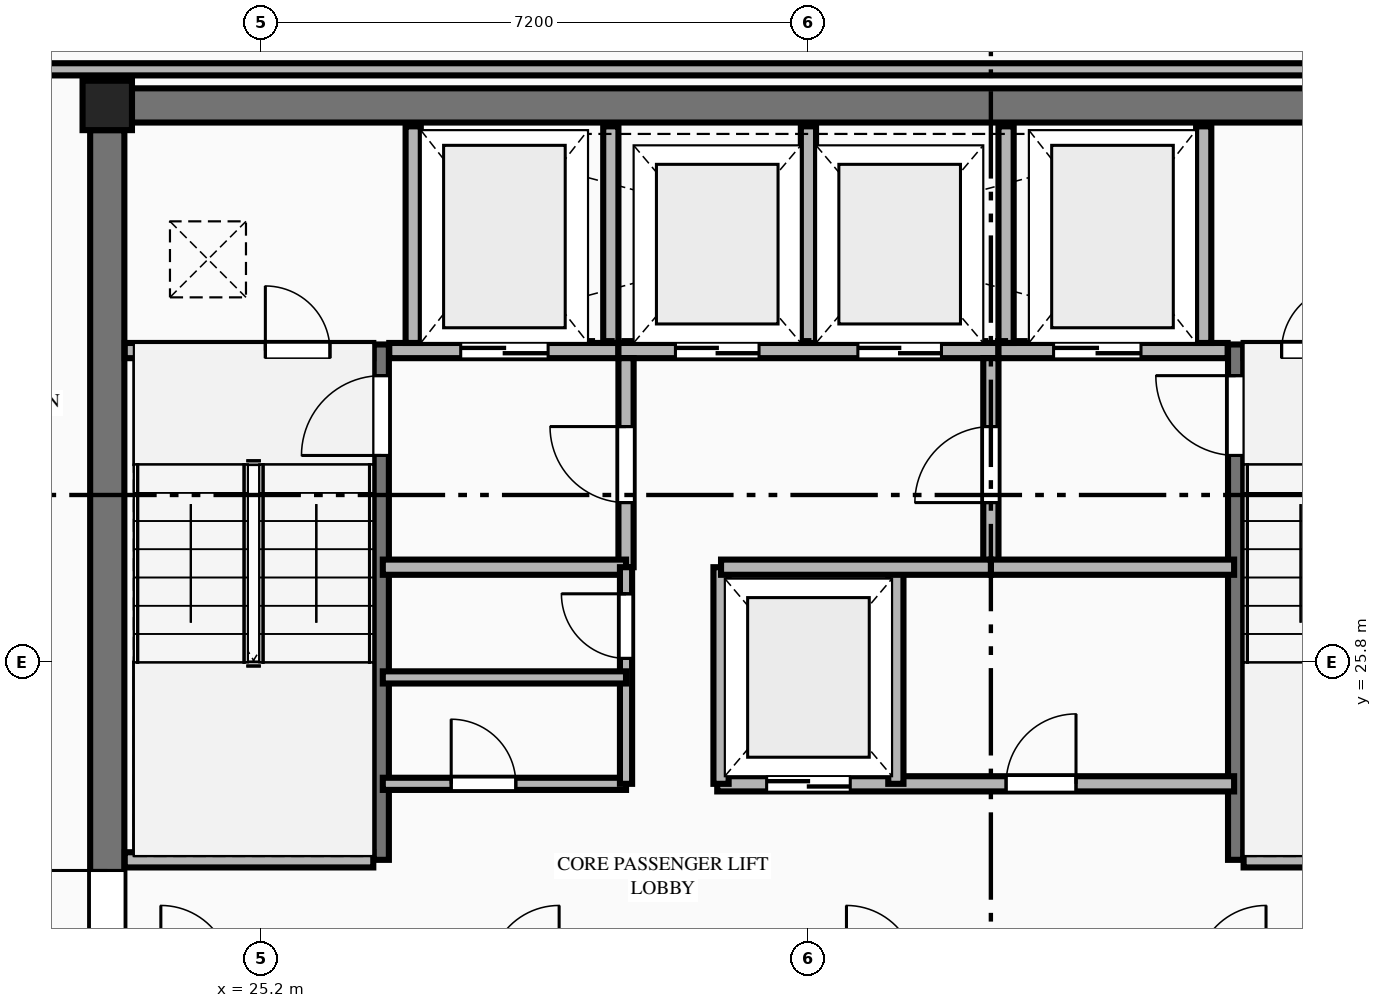
"""IFC4 building model, lengths in metres.
Left out: names, types, materials, properties, quantities, classifications, styles, units other than length and angle.
Written with IfcOpenShell. Run it as: python <this file> out.ifc"""

import sys

from ifc_helpers import new_model, si_unit, direction, frame, frame_2d, origin, origin_2d, place, context, subcontext, project, spatial, rectangle, extrude, element, fill, save


model = new_model("IFC4")
c1 = context("Model", 3, precision=1e-05, world=origin(), true_north=direction((0.0, 1.0)))
c2 = subcontext(c1, "Body", "Model", "MODEL_VIEW")
j1 = project(units=[si_unit("LENGTHUNIT", "METRE"), si_unit("PLANEANGLEUNIT", "RADIAN")], contexts=[c1])
p1 = place(None, origin())
s1 = spatial("IfcSite", under=j1, at=p1, CompositionType="ELEMENT")
p2 = place(p1, origin())
s2 = spatial("IfcBuilding", under=s1, at=p2, CompositionType="ELEMENT")
p3 = place(p2, frame((0.0, 0.0, 278.1)))
s3 = spatial("IfcBuildingStorey", under=s2, at=p3, CompositionType="ELEMENT", Elevation=278.1)
p4 = place(p3, frame((23.175, 33.125, 0.0), z_axis=(0.0, 0.0, 1.0), x_axis=(1.0, 0.0, 0.0)))
e1 = element("IfcColumn", 1, at=p4, inside=s3, PredefinedType="COLUMN", context=c2, shape_type="SweptSolid", body=[
    extrude(rectangle(XDim=0.65, YDim=0.65, at=origin_2d()), origin(), (0.0, 0.0, 1.0), 5.4),
])
p5 = place(p3, frame((23.5, 33.125, 0.0), z_axis=(0.0, 0.0, 1.0), x_axis=(1.0, 0.0, 0.0)))
e2 = element("IfcWall", 2, at=p5, inside=s3, PredefinedType="SHEAR", context=c2, shape_type="SweptSolid", body=[
    extrude(rectangle(XDim=17.8, YDim=0.45, at=frame_2d((8.9, 0.0))), origin(), (0.0, 0.0, 1.0), 5.2),
])
p6 = place(p3, frame((23.175, 19.0, 0.0), z_axis=(0.0, 0.0, 1.0), x_axis=(0.0, 1.0, 0.0)))
e3 = element("IfcWall", 3, at=p6, inside=s3, PredefinedType="SHEAR", context=c2, shape_type="SweptSolid", body=[
    extrude(rectangle(XDim=13.8, YDim=0.45, at=frame_2d((6.9, 0.0))), origin(), (0.0, 0.0, 1.0), 5.2),
])
p7 = place(p6, frame((2.84, 0.0, 0.0)))
e4 = element("IfcOpeningElement", 4, at=p7, cuts=e3, PredefinedType="OPENING", context=c2, shape_type="SweptSolid", body=[
    extrude(rectangle(XDim=1.22, YDim=2.25, at=frame_2d((0.61, 1.125))), frame((0.0, 0.235, 0.0), z_axis=(0.0, -1.0, 0.0), x_axis=(1.0, 0.0, 0.0)), (0.0, 0.0, 1.0), 0.47),
])
p8 = place(p3, frame((26.78, 23.2, 0.0), z_axis=(0.0, 0.0, 1.0), x_axis=(0.0, 1.0, 0.0)))
e5 = element("IfcWall", 5, at=p8, inside=s3, PredefinedType="SHEAR", context=c2, shape_type="SweptSolid", body=[
    extrude(rectangle(XDim=6.78, YDim=0.2, at=frame_2d((3.39, 0.0))), origin(), (0.0, 0.0, 1.0), 5.4),
])
p9 = place(p8, frame((5.32, 0.0, 0.0)))
e6 = element("IfcOpeningElement", 6, at=p9, cuts=e5, PredefinedType="OPENING", context=c2, shape_type="SweptSolid", body=[
    extrude(rectangle(XDim=1.05, YDim=2.15, at=frame_2d((0.525, 1.075))), frame((0.0, 0.11, 0.0), z_axis=(0.0, -1.0, 0.0), x_axis=(1.0, 0.0, 0.0)), (0.0, 0.0, 1.0), 0.22),
])
p10 = place(p3, frame((23.405, 23.2, 0.0), z_axis=(0.0, 0.0, 1.0), x_axis=(1.0, 0.0, 0.0)))
e7 = element("IfcWall", 7, at=p10, inside=s3, PredefinedType="PLUMBINGWALL", context=c2, shape_type="SweptSolid", body=[
    extrude(rectangle(XDim=3.27, YDim=0.2, at=frame_2d((1.635, 0.0))), origin(), (0.0, 0.0, 1.0), 5.2),
])
p11 = place(p3, frame((38.02, 23.2, 0.0), z_axis=(0.0, 0.0, 1.0), x_axis=(0.0, 1.0, 0.0)))
e8 = element("IfcWall", 8, at=p11, inside=s3, PredefinedType="SHEAR", context=c2, shape_type="SweptSolid", body=[
    extrude(rectangle(XDim=6.78, YDim=0.2, at=frame_2d((3.39, 0.0))), origin(), (0.0, 0.0, 1.0), 5.4),
])
p12 = place(p11, frame((5.32, 0.0, 0.0)))
e9 = element("IfcOpeningElement", 9, at=p12, cuts=e8, PredefinedType="OPENING", context=c2, shape_type="SweptSolid", body=[
    extrude(rectangle(XDim=1.05, YDim=2.15, at=frame_2d((0.525, 1.075))), frame((0.0, 0.11, 0.0), z_axis=(0.0, -1.0, 0.0), x_axis=(1.0, 0.0, 0.0)), (0.0, 0.0, 1.0), 0.22),
])
p13 = place(p3, frame((38.125, 23.2, 0.0), z_axis=(0.0, 0.0, 1.0), x_axis=(1.0, 0.0, 0.0)))
e10 = element("IfcWall", 10, at=p13, inside=s3, PredefinedType="PLUMBINGWALL", context=c2, shape_type="SweptSolid", body=[
    extrude(rectangle(XDim=3.27, YDim=0.2, at=frame_2d((1.635, 0.0))), origin(), (0.0, 0.0, 1.0), 5.2),
])
p14 = place(p3, frame((23.405, 29.9, 0.0), z_axis=(0.0, 0.0, 1.0), x_axis=(1.0, 0.0, 0.0)))
e11 = element("IfcWall", 11, at=p14, inside=s3, PredefinedType="PLUMBINGWALL", context=c2, shape_type="SweptSolid", body=[
    extrude(rectangle(XDim=3.27, YDim=0.2, at=frame_2d((1.635, 0.0))), origin(), (0.0, 0.0, 1.0), 5.2),
])
p15 = place(p14, frame((1.85, 0.0, 0.0)))
e12 = element("IfcOpeningElement", 12, at=p15, cuts=e11, PredefinedType="OPENING", context=c2, shape_type="SweptSolid", body=[
    extrude(rectangle(XDim=0.85, YDim=2.05, at=frame_2d((0.425, 1.025))), frame((0.0, 0.11, 0.0), z_axis=(0.0, -1.0, 0.0), x_axis=(1.0, 0.0, 0.0)), (0.0, 0.0, 1.0), 0.22),
])
p16 = place(p3, frame((26.885, 29.9, 0.0), z_axis=(0.0, 0.0, 1.0), x_axis=(1.0, 0.0, 0.0)))
e13 = element("IfcWall", 13, at=p16, inside=s3, PredefinedType="PLUMBINGWALL", context=c2, shape_type="SweptSolid", body=[
    extrude(rectangle(XDim=3.015, YDim=0.2, at=frame_2d((1.507, 0.0))), origin(), (0.0, 0.0, 1.0), 5.2),
])
p17 = place(p16, frame((0.94, 0.0, 0.0)))
e14 = element("IfcOpeningElement", 14, at=p17, cuts=e13, PredefinedType="OPENING", context=c2, shape_type="SweptSolid", body=[
    extrude(rectangle(XDim=1.15, YDim=2.2, at=frame_2d((0.575, 1.1))), frame((0.0, 0.11, 0.0), z_axis=(0.0, -1.0, 0.0), x_axis=(1.0, 0.0, 0.0)), (0.0, 0.0, 1.0), 0.22),
])
p18 = place(p3, frame((29.9, 29.9, 0.0), z_axis=(0.0, 0.0, 1.0), x_axis=(1.0, 0.0, 0.0)))
e15 = element("IfcWall", 15, at=p18, inside=s3, PredefinedType="PLUMBINGWALL", context=c2, shape_type="SweptSolid", body=[
    extrude(rectangle(XDim=5.0, YDim=0.2, at=frame_2d((2.5, 0.0))), origin(), (0.0, 0.0, 1.0), 5.2),
])
p19 = place(p18, frame((0.75, 0.0, 0.0)))
e16 = element("IfcOpeningElement", 16, at=p19, cuts=e15, PredefinedType="OPENING", context=c2, shape_type="SweptSolid", body=[
    extrude(rectangle(XDim=1.1, YDim=2.2, at=frame_2d((0.55, 1.1))), frame((0.0, 0.11, 0.0), z_axis=(0.0, -1.0, 0.0), x_axis=(1.0, 0.0, 0.0)), (0.0, 0.0, 1.0), 0.22),
])
p20 = place(p18, frame((3.15, 0.0, 0.0)))
e17 = element("IfcOpeningElement", 17, at=p20, cuts=e15, PredefinedType="OPENING", context=c2, shape_type="SweptSolid", body=[
    extrude(rectangle(XDim=1.1, YDim=2.2, at=frame_2d((0.55, 1.1))), frame((0.0, 0.11, 0.0), z_axis=(0.0, -1.0, 0.0), x_axis=(1.0, 0.0, 0.0)), (0.0, 0.0, 1.0), 0.22),
])
p21 = place(p3, frame((34.9, 29.9, 0.0), z_axis=(0.0, 0.0, 1.0), x_axis=(1.0, 0.0, 0.0)))
e18 = element("IfcWall", 18, at=p21, inside=s3, PredefinedType="PLUMBINGWALL", context=c2, shape_type="SweptSolid", body=[
    extrude(rectangle(XDim=3.015, YDim=0.2, at=frame_2d((1.508, 0.0))), origin(), (0.0, 0.0, 1.0), 5.2),
])
p22 = place(p21, frame((0.725, 0.0, 0.0)))
e19 = element("IfcOpeningElement", 19, at=p22, cuts=e18, PredefinedType="OPENING", context=c2, shape_type="SweptSolid", body=[
    extrude(rectangle(XDim=1.15, YDim=2.2, at=frame_2d((0.575, 1.1))), frame((0.0, 0.11, 0.0), z_axis=(0.0, -1.0, 0.0), x_axis=(1.0, 0.0, 0.0)), (0.0, 0.0, 1.0), 0.22),
])
p23 = place(p3, frame((38.125, 29.9, 0.0), z_axis=(0.0, 0.0, 1.0), x_axis=(1.0, 0.0, 0.0)))
e20 = element("IfcWall", 20, at=p23, inside=s3, PredefinedType="PLUMBINGWALL", context=c2, shape_type="SweptSolid", body=[
    extrude(rectangle(XDim=3.27, YDim=0.2, at=frame_2d((1.635, 0.0))), origin(), (0.0, 0.0, 1.0), 5.2),
])
p24 = place(p23, frame((0.5, 0.0, 0.0)))
e21 = element("IfcOpeningElement", 21, at=p24, cuts=e20, PredefinedType="OPENING", context=c2, shape_type="SweptSolid", body=[
    extrude(rectangle(XDim=0.85, YDim=2.05, at=frame_2d((0.425, 1.025))), frame((0.0, 0.11, 0.0), z_axis=(0.0, -1.0, 0.0), x_axis=(1.0, 0.0, 0.0)), (0.0, 0.0, 1.0), 0.22),
])
for number, where, z_axis, x_axis in (
    (22, (27.2, 30.0, 0.0), (0.0, 0.0, 1.0), (0.0, 1.0, 0.0)),
    (23, (29.8, 30.0, 0.0), (0.0, 0.0, 1.0), (0.0, 1.0, 0.0)),
    (24, (32.4, 30.0, 0.0), (0.0, 0.0, 1.0), (0.0, 1.0, 0.0)),
    (25, (35.0, 30.0, 0.0), (0.0, 0.0, 1.0), (0.0, 1.0, 0.0)),
    (26, (37.6, 30.0, 0.0), (0.0, 0.0, 1.0), (0.0, 1.0, 0.0)),
):
    element("IfcWall", number, at=place(p3, frame(where, z_axis=z_axis, x_axis=x_axis)), inside=s3, PredefinedType="PLUMBINGWALL", context=c2, shape_type="SweptSolid", body=[
        extrude(rectangle(XDim=2.85, YDim=0.2, at=frame_2d((1.425, 0.0))), origin(), (0.0, 0.0, 1.0), 5.2),
    ])
p25 = place(p3, frame((30.0, 27.05, 0.0), z_axis=(0.0, 0.0, 1.0), x_axis=(0.0, 1.0, 0.0)))
e27 = element("IfcWall", 27, at=p25, inside=s3, PredefinedType="PLUMBINGWALL", context=c2, shape_type="SweptSolid", body=[
    extrude(rectangle(XDim=2.75, YDim=0.2, at=frame_2d((1.375, 0.0))), origin(), (0.0, 0.0, 1.0), 5.2),
])
p26 = place(p25, frame((0.85, 0.0, 0.0)))
e28 = element("IfcOpeningElement", 28, at=p26, cuts=e27, PredefinedType="OPENING", context=c2, shape_type="SweptSolid", body=[
    extrude(rectangle(XDim=1.0, YDim=2.15, at=frame_2d((0.5, 1.075))), frame((0.0, 0.11, 0.0), z_axis=(0.0, -1.0, 0.0), x_axis=(1.0, 0.0, 0.0)), (0.0, 0.0, 1.0), 0.22),
])
p27 = place(p3, frame((26.8, 27.05, 0.0), z_axis=(0.0, 0.0, 1.0), x_axis=(1.0, 0.0, 0.0)))
e29 = element("IfcWall", 29, at=p27, inside=s3, PredefinedType="PLUMBINGWALL", context=c2, shape_type="SweptSolid", body=[
    extrude(rectangle(XDim=3.2, YDim=0.2, at=frame_2d((1.6, 0.0))), origin(), (0.0, 0.0, 1.0), 5.2),
])
p28 = place(p3, frame((34.8, 27.05, 0.0), z_axis=(0.0, 0.0, 1.0), x_axis=(0.0, 1.0, 0.0)))
e30 = element("IfcWall", 30, at=p28, inside=s3, PredefinedType="PLUMBINGWALL", context=c2, shape_type="SweptSolid", body=[
    extrude(rectangle(XDim=2.75, YDim=0.2, at=frame_2d((1.375, 0.0))), origin(), (0.0, 0.0, 1.0), 5.2),
])
p29 = place(p28, frame((0.85, 0.0, 0.0)))
e31 = element("IfcOpeningElement", 31, at=p29, cuts=e30, PredefinedType="OPENING", context=c2, shape_type="SweptSolid", body=[
    extrude(rectangle(XDim=1.0, YDim=2.15, at=frame_2d((0.5, 1.075))), frame((0.0, 0.11, 0.0), z_axis=(0.0, -1.0, 0.0), x_axis=(1.0, 0.0, 0.0)), (0.0, 0.0, 1.0), 0.22),
])
p30 = place(p3, frame((34.8, 27.05, 0.0), z_axis=(0.0, 0.0, 1.0), x_axis=(1.0, 0.0, 0.0)))
e32 = element("IfcWall", 32, at=p30, inside=s3, PredefinedType="PLUMBINGWALL", context=c2, shape_type="SweptSolid", body=[
    extrude(rectangle(XDim=3.2, YDim=0.2, at=frame_2d((1.6, 0.0))), origin(), (0.0, 0.0, 1.0), 5.2),
])
p31 = place(p3, frame((26.8, 24.2, 0.0), z_axis=(0.0, 0.0, 1.0), x_axis=(1.0, 0.0, 0.0)))
e33 = element("IfcWall", 33, at=p31, inside=s3, PredefinedType="PARTITIONING", context=c2, shape_type="SweptSolid", body=[
    extrude(rectangle(XDim=3.2, YDim=0.16, at=frame_2d((1.6, 0.0))), origin(), (0.0, 0.0, 1.0), 5.2),
])
p32 = place(p31, frame((0.9, 0.0, 0.0)))
e34 = element("IfcOpeningElement", 34, at=p32, cuts=e33, PredefinedType="OPENING", context=c2, shape_type="SweptSolid", body=[
    extrude(rectangle(XDim=0.85, YDim=2.05, at=frame_2d((0.425, 1.025))), frame((0.0, 0.09, 0.0), z_axis=(0.0, -1.0, 0.0), x_axis=(1.0, 0.0, 0.0)), (0.0, 0.0, 1.0), 0.18),
])
p33 = place(p3, frame((30.0, 24.2, 0.0), z_axis=(0.0, 0.0, 1.0), x_axis=(0.0, 1.0, 0.0)))
e35 = element("IfcWall", 35, at=p33, inside=s3, PredefinedType="PARTITIONING", context=c2, shape_type="SweptSolid", body=[
    extrude(rectangle(XDim=2.85, YDim=0.16, at=frame_2d((1.425, 0.0))), origin(), (0.0, 0.0, 1.0), 5.2),
])
p34 = place(p33, frame((1.65, 0.0, 0.0)))
e36 = element("IfcOpeningElement", 36, at=p34, cuts=e35, PredefinedType="OPENING", context=c2, shape_type="SweptSolid", body=[
    extrude(rectangle(XDim=0.85, YDim=2.05, at=frame_2d((0.425, 1.025))), frame((0.0, 0.09, 0.0), z_axis=(0.0, -1.0, 0.0), x_axis=(1.0, 0.0, 0.0)), (0.0, 0.0, 1.0), 0.18),
])
p35 = place(p3, frame((31.2, 24.2, 0.0), z_axis=(0.0, 0.0, 1.0), x_axis=(1.0, 0.0, 0.0)))
e37 = element("IfcWall", 37, at=p35, inside=s3, PredefinedType="PLUMBINGWALL", context=c2, shape_type="SweptSolid", body=[
    extrude(rectangle(XDim=6.8, YDim=0.2, at=frame_2d((3.4, 0.0))), origin(), (0.0, 0.0, 1.0), 5.2),
])
p36 = place(p35, frame((0.65, 0.0, 0.0)))
e38 = element("IfcOpeningElement", 38, at=p36, cuts=e37, PredefinedType="OPENING", context=c2, shape_type="SweptSolid", body=[
    extrude(rectangle(XDim=1.1, YDim=2.2, at=frame_2d((0.55, 1.1))), frame((0.0, 0.11, 0.0), z_axis=(0.0, -1.0, 0.0), x_axis=(1.0, 0.0, 0.0)), (0.0, 0.0, 1.0), 0.22),
])
p37 = place(p35, frame((3.8, 0.0, 0.0)))
e39 = element("IfcOpeningElement", 39, at=p37, cuts=e37, PredefinedType="OPENING", context=c2, shape_type="SweptSolid", body=[
    extrude(rectangle(XDim=0.92, YDim=2.15, at=frame_2d((0.46, 1.075))), frame((0.0, 0.11, 0.0), z_axis=(0.0, -1.0, 0.0), x_axis=(1.0, 0.0, 0.0)), (0.0, 0.0, 1.0), 0.22),
])
for number, where, z_axis, x_axis in (
    (40, (31.25, 24.2, 0.0), (0.0, 0.0, 1.0), (0.0, 1.0, 0.0)),
    (41, (33.55, 24.2, 0.0), (0.0, 0.0, 1.0), (0.0, 1.0, 0.0)),
):
    element("IfcWall", number, at=place(p3, frame(where, z_axis=z_axis, x_axis=x_axis)), inside=s3, PredefinedType="PLUMBINGWALL", context=c2, shape_type="SweptSolid", body=[
        extrude(rectangle(XDim=2.85, YDim=0.2, at=frame_2d((1.425, 0.0))), origin(), (0.0, 0.0, 1.0), 5.2),
    ])
p38 = place(p3, frame((31.25, 27.05, 0.0), z_axis=(0.0, 0.0, 1.0), x_axis=(1.0, 0.0, 0.0)))
e42 = element("IfcWall", 42, at=p38, inside=s3, PredefinedType="PLUMBINGWALL", context=c2, shape_type="SweptSolid", body=[
    extrude(rectangle(XDim=3.55, YDim=0.2, at=frame_2d((1.775, 0.0))), origin(), (0.0, 0.0, 1.0), 5.2),
])
p39 = place(p3, frame((26.8, 25.6, 0.0), z_axis=(0.0, 0.0, 1.0), x_axis=(1.0, 0.0, 0.0)))
e43 = element("IfcWall", 43, at=p39, inside=s3, PredefinedType="PARTITIONING", context=c2, shape_type="SweptSolid", body=[
    extrude(rectangle(XDim=3.2, YDim=0.16, at=frame_2d((1.6, 0.0))), origin(), (0.0, 0.0, 1.0), 5.2),
])
p40 = place(p3, frame((15.079, 33.6, 0.0), z_axis=(0.0, 0.0, 1.0), x_axis=(1.0, 0.0, 0.0)))
e44 = element("IfcWall", 44, at=p40, inside=s3, PredefinedType="PARTITIONING", context=c2, shape_type="SweptSolid", body=[
    extrude(rectangle(XDim=34.642, YDim=0.16, at=frame_2d((17.321, 0.0))), origin(), (0.0, 0.0, 1.0), 5.2),
])
p41 = place(p40, frame((5.871, 0.0, 0.0)))
e45 = element("IfcOpeningElement", 45, at=p41, cuts=e44, PredefinedType="OPENING", context=c2, shape_type="SweptSolid", body=[
    extrude(rectangle(XDim=1.35, YDim=2.35, at=frame_2d((0.675, 1.175))), frame((0.0, 0.09, 0.0), z_axis=(0.0, -1.0, 0.0), x_axis=(1.0, 0.0, 0.0)), (0.0, 0.0, 1.0), 0.18),
])
p42 = place(p40, frame((27.271, 0.0, 0.0)))
e46 = element("IfcOpeningElement", 46, at=p42, cuts=e44, PredefinedType="OPENING", context=c2, shape_type="SweptSolid", body=[
    extrude(rectangle(XDim=1.35, YDim=2.35, at=frame_2d((0.675, 1.175))), frame((0.0, 0.09, 0.0), z_axis=(0.0, -1.0, 0.0), x_axis=(1.0, 0.0, 0.0)), (0.0, 0.0, 1.0), 0.18),
])
p43 = place(p7, origin())
e47 = element("IfcDoor", 47, at=p43, inside=s3, OperationType="SINGLE_SWING_RIGHT", PredefinedType="DOOR", context=c2, shape_type="SweptSolid", body=[
    extrude(rectangle(XDim=1.22, YDim=2.25, at=frame_2d((0.61, 1.125))), frame((0.0, 0.025, 0.0), z_axis=(0.0, -1.0, 0.0), x_axis=(1.0, 0.0, 0.0)), (0.0, 0.0, 1.0), 0.05),
])
fill(e4, e47)
p44 = place(p9, origin())
e48 = element("IfcDoor", 48, at=p44, inside=s3, OperationType="SINGLE_SWING_LEFT", PredefinedType="DOOR", context=c2, shape_type="SweptSolid", body=[
    extrude(rectangle(XDim=1.05, YDim=2.15, at=frame_2d((0.525, 1.075))), frame((0.0, 0.025, 0.0), z_axis=(0.0, -1.0, 0.0), x_axis=(1.0, 0.0, 0.0)), (0.0, 0.0, 1.0), 0.05),
])
fill(e6, e48)
p45 = place(p12, origin())
e49 = element("IfcDoor", 49, at=p45, inside=s3, OperationType="SINGLE_SWING_RIGHT", PredefinedType="DOOR", context=c2, shape_type="SweptSolid", body=[
    extrude(rectangle(XDim=1.05, YDim=2.15, at=frame_2d((0.525, 1.075))), frame((0.0, 0.025, 0.0), z_axis=(0.0, -1.0, 0.0), x_axis=(1.0, 0.0, 0.0)), (0.0, 0.0, 1.0), 0.05),
])
fill(e9, e49)
p46 = place(p15, origin())
e50 = element("IfcDoor", 50, at=p46, inside=s3, OperationType="SINGLE_SWING_LEFT", PredefinedType="DOOR", context=c2, shape_type="SweptSolid", body=[
    extrude(rectangle(XDim=0.85, YDim=2.05, at=frame_2d((0.425, 1.025))), frame((0.0, 0.025, 0.0), z_axis=(0.0, -1.0, 0.0), x_axis=(1.0, 0.0, 0.0)), (0.0, 0.0, 1.0), 0.05),
])
fill(e12, e50)
p47 = place(p24, origin())
e51 = element("IfcDoor", 51, at=p47, inside=s3, OperationType="SINGLE_SWING_RIGHT", PredefinedType="DOOR", context=c2, shape_type="SweptSolid", body=[
    extrude(rectangle(XDim=0.85, YDim=2.05, at=frame_2d((0.425, 1.025))), frame((0.0, 0.025, 0.0), z_axis=(0.0, -1.0, 0.0), x_axis=(1.0, 0.0, 0.0)), (0.0, 0.0, 1.0), 0.05),
])
fill(e21, e51)
p48 = place(p17, origin())
e52 = element("IfcDoor", 52, at=p48, inside=s3, OperationType="DOUBLE_DOOR_SLIDING", PredefinedType="DOOR", context=c2, shape_type="SweptSolid", body=[
    extrude(rectangle(XDim=1.15, YDim=2.2, at=frame_2d((0.575, 1.1))), frame((0.0, 0.025, 0.0), z_axis=(0.0, -1.0, 0.0), x_axis=(1.0, 0.0, 0.0)), (0.0, 0.0, 1.0), 0.05),
])
fill(e14, e52)
p49 = place(p22, origin())
e53 = element("IfcDoor", 53, at=p49, inside=s3, OperationType="DOUBLE_DOOR_SLIDING", PredefinedType="DOOR", context=c2, shape_type="SweptSolid", body=[
    extrude(rectangle(XDim=1.15, YDim=2.2, at=frame_2d((0.575, 1.1))), frame((0.0, 0.025, 0.0), z_axis=(0.0, -1.0, 0.0), x_axis=(1.0, 0.0, 0.0)), (0.0, 0.0, 1.0), 0.05),
])
fill(e19, e53)
p50 = place(p19, origin())
e54 = element("IfcDoor", 54, at=p50, inside=s3, OperationType="DOUBLE_DOOR_SLIDING", PredefinedType="DOOR", context=c2, shape_type="SweptSolid", body=[
    extrude(rectangle(XDim=1.1, YDim=2.2, at=frame_2d((0.55, 1.1))), frame((0.0, 0.025, 0.0), z_axis=(0.0, -1.0, 0.0), x_axis=(1.0, 0.0, 0.0)), (0.0, 0.0, 1.0), 0.05),
])
fill(e16, e54)
p51 = place(p20, origin())
e55 = element("IfcDoor", 55, at=p51, inside=s3, OperationType="DOUBLE_DOOR_SLIDING", PredefinedType="DOOR", context=c2, shape_type="SweptSolid", body=[
    extrude(rectangle(XDim=1.1, YDim=2.2, at=frame_2d((0.55, 1.1))), frame((0.0, 0.025, 0.0), z_axis=(0.0, -1.0, 0.0), x_axis=(1.0, 0.0, 0.0)), (0.0, 0.0, 1.0), 0.05),
])
fill(e17, e55)
p52 = place(p26, origin())
e56 = element("IfcDoor", 56, at=p52, inside=s3, OperationType="SINGLE_SWING_RIGHT", PredefinedType="DOOR", context=c2, shape_type="SweptSolid", body=[
    extrude(rectangle(XDim=1.0, YDim=2.15, at=frame_2d((0.5, 1.075))), frame((0.0, 0.025, 0.0), z_axis=(0.0, -1.0, 0.0), x_axis=(1.0, 0.0, 0.0)), (0.0, 0.0, 1.0), 0.05),
])
fill(e28, e56)
p53 = place(p29, origin())
e57 = element("IfcDoor", 57, at=p53, inside=s3, OperationType="SINGLE_SWING_LEFT", PredefinedType="DOOR", context=c2, shape_type="SweptSolid", body=[
    extrude(rectangle(XDim=1.0, YDim=2.15, at=frame_2d((0.5, 1.075))), frame((0.0, 0.025, 0.0), z_axis=(0.0, -1.0, 0.0), x_axis=(1.0, 0.0, 0.0)), (0.0, 0.0, 1.0), 0.05),
])
fill(e31, e57)
p54 = place(p36, origin())
e58 = element("IfcDoor", 58, at=p54, inside=s3, OperationType="DOUBLE_DOOR_SLIDING", PredefinedType="DOOR", context=c2, shape_type="SweptSolid", body=[
    extrude(rectangle(XDim=1.1, YDim=2.2, at=frame_2d((0.55, 1.1))), frame((0.0, 0.025, 0.0), z_axis=(0.0, -1.0, 0.0), x_axis=(1.0, 0.0, 0.0)), (0.0, 0.0, 1.0), 0.05),
])
fill(e38, e58)
p55 = place(p32, origin())
e59 = element("IfcDoor", 59, at=p55, inside=s3, OperationType="SINGLE_SWING_LEFT", PredefinedType="DOOR", context=c2, shape_type="SweptSolid", body=[
    extrude(rectangle(XDim=0.85, YDim=2.05, at=frame_2d((0.425, 1.025))), frame((0.0, 0.025, 0.0), z_axis=(0.0, -1.0, 0.0), x_axis=(1.0, 0.0, 0.0)), (0.0, 0.0, 1.0), 0.05),
])
fill(e34, e59)
p56 = place(p34, origin())
e60 = element("IfcDoor", 60, at=p56, inside=s3, OperationType="SINGLE_SWING_RIGHT", PredefinedType="DOOR", context=c2, shape_type="SweptSolid", body=[
    extrude(rectangle(XDim=0.85, YDim=2.05, at=frame_2d((0.425, 1.025))), frame((0.0, 0.025, 0.0), z_axis=(0.0, -1.0, 0.0), x_axis=(1.0, 0.0, 0.0)), (0.0, 0.0, 1.0), 0.05),
])
fill(e36, e60)
p57 = place(p37, origin())
e61 = element("IfcDoor", 61, at=p57, inside=s3, OperationType="SINGLE_SWING_RIGHT", PredefinedType="DOOR", context=c2, shape_type="SweptSolid", body=[
    extrude(rectangle(XDim=0.92, YDim=2.15, at=frame_2d((0.46, 1.075))), frame((0.0, 0.025, 0.0), z_axis=(0.0, -1.0, 0.0), x_axis=(1.0, 0.0, 0.0)), (0.0, 0.0, 1.0), 0.05),
])
fill(e39, e61)
save(model, sys.argv[1])
